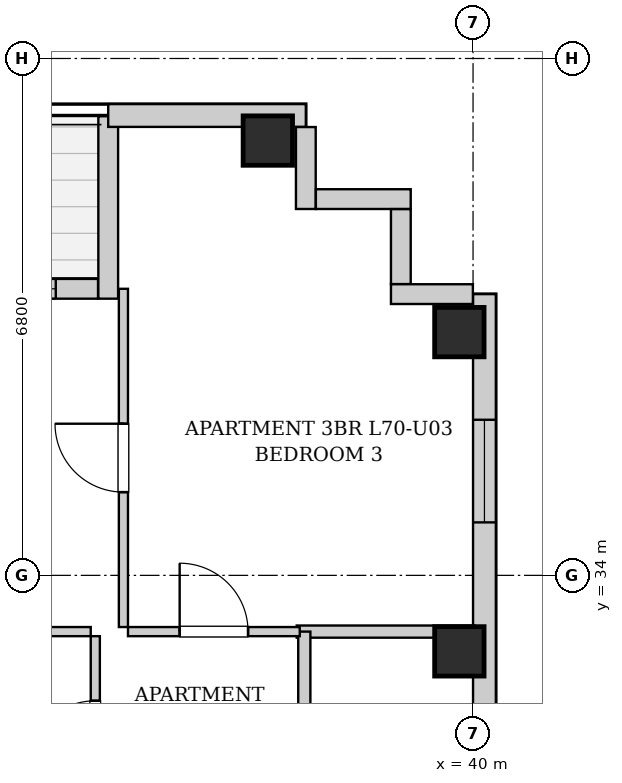
"""IFC4 building model, lengths in metres.
Left out: names, types, materials, properties, quantities, classifications, styles, units other than length and angle.
Written with IfcOpenShell. Run it as: python <this file> out.ifc"""

import sys

from ifc_helpers import new_model, si_unit, direction, frame, frame_2d, origin, origin_2d, place, context, subcontext, project, spatial, rectangle, extrude, element, fill, save


model = new_model("IFC4")
c1 = context("Model", 3, precision=1e-05, world=origin(), true_north=direction((0.0, 1.0)))
c2 = subcontext(c1, "Body", "Model", "MODEL_VIEW")
j1 = project(units=[si_unit("LENGTHUNIT", "METRE"), si_unit("PLANEANGLEUNIT", "RADIAN")], contexts=[c1])
p1 = place(None, origin())
s1 = spatial("IfcSite", under=j1, at=p1, CompositionType="ELEMENT")
p2 = place(p1, origin())
s2 = spatial("IfcBuilding", under=s1, at=p2, CompositionType="ELEMENT")
p3 = place(p2, frame((0.0, 0.0, 241.1)))
s3 = spatial("IfcBuildingStorey", under=s2, at=p3, CompositionType="ELEMENT", Elevation=241.1)
for number, where, z_axis, x_axis in (
    (1, (37.3, 39.72, 0.0), (0.0, 0.0, 1.0), (1.0, 0.0, 0.0)),
    (2, (39.82, 33.0, 0.0), (0.0, 0.0, 1.0), (1.0, 0.0, 0.0)),
    (3, (39.82, 37.2, 0.0), (0.0, 0.0, 1.0), (1.0, 0.0, 0.0)),
):
    element("IfcColumn", number, at=place(p3, frame(where, z_axis=z_axis, x_axis=x_axis)), inside=s3, PredefinedType="COLUMN", context=c2, shape_type="SweptSolid", body=[
        extrude(rectangle(XDim=0.65, YDim=0.65, at=origin_2d()), origin(), (0.0, 0.0, 1.0), 3.4),
    ])
p4 = place(p3, frame((29.634, 37.77, 0.0), z_axis=(0.0, 0.0, 1.0), x_axis=(1.0, 0.0, 0.0)))
e4 = element("IfcWall", 4, at=p4, inside=s3, PredefinedType="SOLIDWALL", context=c2, shape_type="SweptSolid", body=[
    extrude(rectangle(XDim=5.432, YDim=0.26, at=frame_2d((2.716, 0.0))), origin(), (0.0, 0.0, 1.0), 3.14),
])
p5 = place(p4, frame((2.166, 0.0, 0.0)))
e5 = element("IfcOpeningElement", 5, at=p5, cuts=e4, PredefinedType="OPENING", context=c2, shape_type="SweptSolid", body=[
    extrude(rectangle(XDim=1.1, YDim=2.0, at=frame_2d((0.55, 1.0))), frame((0.0, 0.14, 0.0), z_axis=(0.0, -1.0, 0.0), x_axis=(1.0, 0.0, 0.0)), (0.0, 0.0, 1.0), 0.28),
])
p6 = place(p4, frame((3.526, 0.0, 0.55)))
e6 = element("IfcOpeningElement", 6, at=p6, cuts=e4, PredefinedType="OPENING", context=c2, shape_type="SweptSolid", body=[
    extrude(rectangle(XDim=1.35, YDim=1.2, at=frame_2d((0.675, 0.6))), frame((0.0, 0.14, 0.0), z_axis=(0.0, -1.0, 0.0), x_axis=(1.0, 0.0, 0.0)), (0.0, 0.0, 1.0), 0.28),
])
p7 = place(p3, frame((35.2, 37.64, 0.0), z_axis=(0.0, 0.0, 1.0), x_axis=(0.0, 1.0, 0.0)))
e7 = element("IfcWall", 7, at=p7, inside=s3, PredefinedType="SOLIDWALL", context=c2, shape_type="SweptSolid", body=[
    extrude(rectangle(XDim=2.4, YDim=0.26, at=frame_2d((1.2, 0.0))), origin(), (0.0, 0.0, 1.0), 3.14),
])
p8 = place(p3, frame((35.2, 40.05, 0.0), z_axis=(0.0, 0.0, 1.0), x_axis=(1.0, 0.0, 0.0)))
e8 = element("IfcWall", 8, at=p8, inside=s3, PredefinedType="SOLIDWALL", context=c2, shape_type="SweptSolid", body=[
    extrude(rectangle(XDim=2.6, YDim=0.3, at=frame_2d((1.3, 0.0))), origin(), (0.0, 0.0, 1.0), 3.14),
])
p9 = place(p3, frame((40.15, 37.7, 0.0), z_axis=(0.0, 0.0, 1.0), x_axis=(0.0, -1.0, 0.0)))
e9 = element("IfcWall", 9, at=p9, inside=s3, PredefinedType="SOLIDWALL", context=c2, shape_type="SweptSolid", body=[
    extrude(rectangle(XDim=31.4, YDim=0.3, at=frame_2d((15.7, 0.0))), origin(), (0.0, 0.0, 1.0), 3.14),
])
p10 = place(p9, frame((28.396, 0.0, 0.55)))
e10 = element("IfcOpeningElement", 10, at=p10, cuts=e9, PredefinedType="OPENING", context=c2, shape_type="SweptSolid", body=[
    extrude(rectangle(XDim=1.35, YDim=1.2, at=frame_2d((0.675, 0.6))), frame((0.0, 0.16, 0.0), z_axis=(0.0, -1.0, 0.0), x_axis=(1.0, 0.0, 0.0)), (0.0, 0.0, 1.0), 0.32),
])
p11 = place(p9, frame((1.653, 0.0, 0.55)))
e11 = element("IfcOpeningElement", 11, at=p11, cuts=e9, PredefinedType="OPENING", context=c2, shape_type="SweptSolid", body=[
    extrude(rectangle(XDim=1.35, YDim=1.2, at=frame_2d((0.675, 0.6))), frame((0.0, 0.16, 0.0), z_axis=(0.0, -1.0, 0.0), x_axis=(1.0, 0.0, 0.0)), (0.0, 0.0, 1.0), 0.32),
])
p12 = place(p9, frame((19.683, 0.0, 0.55)))
e12 = element("IfcOpeningElement", 12, at=p12, cuts=e9, PredefinedType="OPENING", context=c2, shape_type="SweptSolid", body=[
    extrude(rectangle(XDim=1.35, YDim=1.2, at=frame_2d((0.675, 0.6))), frame((0.0, 0.16, 0.0), z_axis=(0.0, -1.0, 0.0), x_axis=(1.0, 0.0, 0.0)), (0.0, 0.0, 1.0), 0.32),
])
p13 = place(p9, frame((10.367, 0.0, 0.55)))
e13 = element("IfcOpeningElement", 13, at=p13, cuts=e9, PredefinedType="OPENING", context=c2, shape_type="SweptSolid", body=[
    extrude(rectangle(XDim=1.35, YDim=1.2, at=frame_2d((0.675, 0.6))), frame((0.0, 0.16, 0.0), z_axis=(0.0, -1.0, 0.0), x_axis=(1.0, 0.0, 0.0)), (0.0, 0.0, 1.0), 0.32),
])
p14 = place(p3, frame((37.8, 39.898, 0.0), z_axis=(0.0, 0.0, 1.0), x_axis=(0.0, -1.0, 0.0)))
e14 = element("IfcWall", 14, at=p14, inside=s3, PredefinedType="SOLIDWALL", context=c2, shape_type="SweptSolid", body=[
    extrude(rectangle(XDim=1.078, YDim=0.26, at=frame_2d((0.539, 0.0))), origin(), (0.0, 0.0, 1.0), 3.14),
])
p15 = place(p3, frame((37.932, 38.95, 0.0), z_axis=(0.0, 0.0, 1.0), x_axis=(1.0, 0.0, 0.0)))
e15 = element("IfcWall", 15, at=p15, inside=s3, PredefinedType="SOLIDWALL", context=c2, shape_type="SweptSolid", body=[
    extrude(rectangle(XDim=1.248, YDim=0.26, at=frame_2d((0.624, 0.0))), origin(), (0.0, 0.0, 1.0), 3.14),
])
p16 = place(p3, frame((39.05, 38.818, 0.0), z_axis=(0.0, 0.0, 1.0), x_axis=(0.0, -1.0, 0.0)))
e16 = element("IfcWall", 16, at=p16, inside=s3, PredefinedType="SOLIDWALL", context=c2, shape_type="SweptSolid", body=[
    extrude(rectangle(XDim=0.986, YDim=0.26, at=frame_2d((0.493, 0.0))), origin(), (0.0, 0.0, 1.0), 3.14),
])
p17 = place(p3, frame((38.92, 37.7, 0.0), z_axis=(0.0, 0.0, 1.0), x_axis=(1.0, 0.0, 0.0)))
e17 = element("IfcWall", 17, at=p17, inside=s3, PredefinedType="SOLIDWALL", context=c2, shape_type="SweptSolid", body=[
    extrude(rectangle(XDim=1.078, YDim=0.26, at=frame_2d((0.539, 0.0))), origin(), (0.0, 0.0, 1.0), 3.14),
])
p18 = place(p3, frame((37.68, 33.26, 0.0), z_axis=(0.0, 0.0, 1.0), x_axis=(1.0, 0.0, 0.0)))
e18 = element("IfcWall", 18, at=p18, inside=s3, PredefinedType="PARTITIONING", context=c2, shape_type="SweptSolid", body=[
    extrude(rectangle(XDim=2.34, YDim=0.16, at=frame_2d((1.17, 0.0))), origin(), (0.0, 0.0, 1.0), 3.14),
])
p19 = place(p3, frame((37.78, 30.6, 0.0), z_axis=(0.0, 0.0, 1.0), x_axis=(0.0, 1.0, 0.0)))
e19 = element("IfcWall", 19, at=p19, inside=s3, PredefinedType="PARTITIONING", context=c2, shape_type="SweptSolid", body=[
    extrude(rectangle(XDim=2.66, YDim=0.16, at=frame_2d((1.33, 0.0))), origin(), (0.0, 0.0, 1.0), 3.14),
])
p20 = place(p3, frame((35.03, 30.6, 0.0), z_axis=(0.0, 0.0, 1.0), x_axis=(0.0, 1.0, 0.0)))
e20 = element("IfcWall", 20, at=p20, inside=s3, PredefinedType="PARTITIONING", context=c2, shape_type="SweptSolid", body=[
    extrude(rectangle(XDim=2.6, YDim=0.12, at=frame_2d((1.3, 0.0))), origin(), (0.0, 0.0, 1.0), 3.14),
])
p21 = place(p20, frame((0.85, 0.0, 0.0)))
e21 = element("IfcOpeningElement", 21, at=p21, cuts=e20, PredefinedType="OPENING", context=c2, shape_type="SweptSolid", body=[
    extrude(rectangle(XDim=0.9, YDim=2.05, at=frame_2d((0.45, 1.025))), frame((0.0, 0.07, 0.0), z_axis=(0.0, -1.0, 0.0), x_axis=(1.0, 0.0, 0.0)), (0.0, 0.0, 1.0), 0.14),
])
p22 = place(p3, frame((31.37, 33.26, 0.0), z_axis=(0.0, 0.0, 1.0), x_axis=(1.0, 0.0, 0.0)))
e22 = element("IfcWall", 22, at=p22, inside=s3, PredefinedType="PARTITIONING", context=c2, shape_type="SweptSolid", body=[
    extrude(rectangle(XDim=3.6, YDim=0.12, at=frame_2d((1.8, 0.0))), origin(), (0.0, 0.0, 1.0), 3.14),
])
p23 = place(p22, frame((1.35, 0.0, 0.0)))
e23 = element("IfcOpeningElement", 23, at=p23, cuts=e22, PredefinedType="OPENING", context=c2, shape_type="SweptSolid", body=[
    extrude(rectangle(XDim=0.9, YDim=2.05, at=frame_2d((0.45, 1.025))), frame((0.0, 0.07, 0.0), z_axis=(0.0, -1.0, 0.0), x_axis=(1.0, 0.0, 0.0)), (0.0, 0.0, 1.0), 0.14),
])
p24 = place(p3, frame((35.46, 33.26, 0.0), z_axis=(0.0, 0.0, 1.0), x_axis=(1.0, 0.0, 0.0)))
e24 = element("IfcWall", 24, at=p24, inside=s3, PredefinedType="PARTITIONING", context=c2, shape_type="SweptSolid", body=[
    extrude(rectangle(XDim=2.26, YDim=0.12, at=frame_2d((1.13, 0.0))), origin(), (0.0, 0.0, 1.0), 3.14),
])
p25 = place(p24, frame((0.68, 0.0, 0.0)))
e25 = element("IfcOpeningElement", 25, at=p25, cuts=e24, PredefinedType="OPENING", context=c2, shape_type="SweptSolid", body=[
    extrude(rectangle(XDim=0.9, YDim=2.05, at=frame_2d((0.45, 1.025))), frame((0.0, 0.07, 0.0), z_axis=(0.0, -1.0, 0.0), x_axis=(1.0, 0.0, 0.0)), (0.0, 0.0, 1.0), 0.14),
])
p26 = place(p3, frame((35.4, 33.32, 0.0), z_axis=(0.0, 0.0, 1.0), x_axis=(0.0, 1.0, 0.0)))
e26 = element("IfcWall", 26, at=p26, inside=s3, PredefinedType="PARTITIONING", context=c2, shape_type="SweptSolid", body=[
    extrude(rectangle(XDim=4.45, YDim=0.12, at=frame_2d((2.225, 0.0))), origin(), (0.0, 0.0, 1.0), 3.14),
])
p27 = place(p26, frame((1.775, 0.0, 0.0)))
e27 = element("IfcOpeningElement", 27, at=p27, cuts=e26, PredefinedType="OPENING", context=c2, shape_type="SweptSolid", body=[
    extrude(rectangle(XDim=0.9, YDim=2.05, at=frame_2d((0.45, 1.025))), frame((0.0, 0.07, 0.0), z_axis=(0.0, -1.0, 0.0), x_axis=(1.0, 0.0, 0.0)), (0.0, 0.0, 1.0), 0.14),
])
p28 = place(p21, origin())
e28 = element("IfcDoor", 28, at=p28, inside=s3, OperationType="SINGLE_SWING_LEFT", PredefinedType="DOOR", context=c2, shape_type="SweptSolid", body=[
    extrude(rectangle(XDim=0.9, YDim=2.05, at=frame_2d((0.45, 1.025))), frame((0.0, 0.025, 0.0), z_axis=(0.0, -1.0, 0.0), x_axis=(1.0, 0.0, 0.0)), (0.0, 0.0, 1.0), 0.05),
])
fill(e21, e28)
p29 = place(p25, origin())
e29 = element("IfcDoor", 29, at=p29, inside=s3, OperationType="SINGLE_SWING_LEFT", PredefinedType="DOOR", context=c2, shape_type="SweptSolid", body=[
    extrude(rectangle(XDim=0.9, YDim=2.05, at=frame_2d((0.45, 1.025))), frame((0.0, 0.025, 0.0), z_axis=(0.0, -1.0, 0.0), x_axis=(1.0, 0.0, 0.0)), (0.0, 0.0, 1.0), 0.05),
])
fill(e25, e29)
p30 = place(p27, origin())
e30 = element("IfcDoor", 30, at=p30, inside=s3, OperationType="SINGLE_SWING_RIGHT", PredefinedType="DOOR", context=c2, shape_type="SweptSolid", body=[
    extrude(rectangle(XDim=0.9, YDim=2.05, at=frame_2d((0.45, 1.025))), frame((0.0, 0.025, 0.0), z_axis=(0.0, -1.0, 0.0), x_axis=(1.0, 0.0, 0.0)), (0.0, 0.0, 1.0), 0.05),
])
fill(e27, e30)
p31 = place(p6, origin())
e31 = element("IfcWindow", 31, at=p31, inside=s3, PartitioningType="SINGLE_PANEL", PredefinedType="WINDOW", context=c2, shape_type="SweptSolid", body=[
    extrude(rectangle(XDim=1.35, YDim=1.2, at=frame_2d((0.675, 0.6))), frame((0.0, 0.03, 0.0), z_axis=(0.0, -1.0, 0.0), x_axis=(1.0, 0.0, 0.0)), (0.0, 0.0, 1.0), 0.06),
])
fill(e6, e31)
p32 = place(p11, origin())
e32 = element("IfcWindow", 32, at=p32, inside=s3, PartitioningType="SINGLE_PANEL", PredefinedType="WINDOW", context=c2, shape_type="SweptSolid", body=[
    extrude(rectangle(XDim=1.35, YDim=1.2, at=frame_2d((0.675, 0.6))), frame((0.0, 0.03, 0.0), z_axis=(0.0, -1.0, 0.0), x_axis=(1.0, 0.0, 0.0)), (0.0, 0.0, 1.0), 0.06),
])
fill(e11, e32)
save(model, sys.argv[1])
